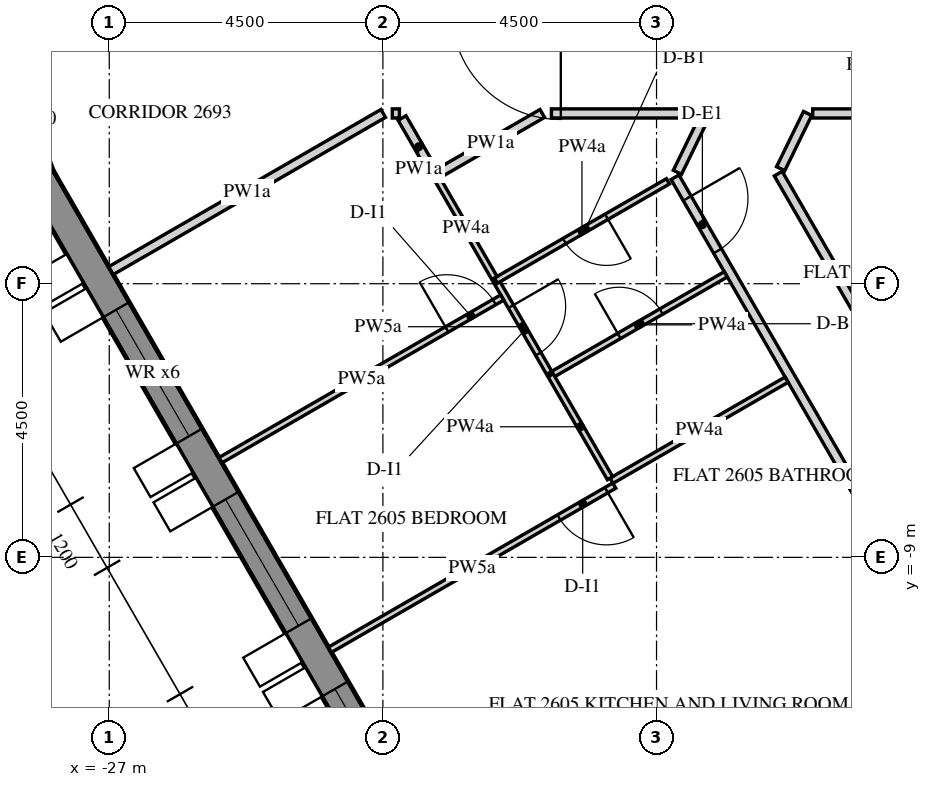
"""IFC4 building model, lengths in metres.
Left out: names, types, materials, properties, quantities, classifications, styles, units other than length and angle.
Written with IfcOpenShell. Run it as: python <this file> out.ifc"""

import sys

from ifc_helpers import new_model, si_unit, direction, frame, frame_2d, origin, place, context, subcontext, project, spatial, polyline, rectangle, outline, extrude, element, fill, save


model = new_model("IFC4")
c1 = context("Model", 3, precision=1e-05, world=origin(), true_north=direction((0.0, 1.0)))
c2 = subcontext(c1, "Body", "Model", "MODEL_VIEW")
j1 = project(units=[si_unit("LENGTHUNIT", "METRE"), si_unit("PLANEANGLEUNIT", "RADIAN")], contexts=[c1])
p1 = place(None, origin())
s1 = spatial("IfcSite", under=j1, at=p1, CompositionType="ELEMENT")
p2 = place(p1, origin())
s2 = spatial("IfcBuilding", under=s1, at=p2, CompositionType="ELEMENT")
p3 = place(p2, frame((0.0, 0.0, 326.4)))
s3 = spatial("IfcBuildingStorey", under=s2, at=p3, CompositionType="ELEMENT", Elevation=326.4)
p4 = place(p3, frame((-28.578, -1.606, -0.15), z_axis=(0.0, 0.0, 1.0), x_axis=(0.352838463023, -0.935684251771, 0.0)))
e1 = element("IfcWall", 1, at=p4, inside=s3, PredefinedType="SOLIDWALL", context=c2, shape_type="SweptSolid", body=[
    extrude(outline(polyline([(-0.041, -0.25), (1.237, -0.25), (1.196, 0.25), (0.041, 0.25), (-0.041, -0.25)])), origin(), (0.0, 0.0, 1.0), 3.9),
])
p5 = place(p3, frame((-28.149, -2.745, -0.15), z_axis=(0.0, 0.0, 1.0), x_axis=(0.500003737743, -0.866023245787, 0.0)))
e2 = element("IfcWall", 2, at=p5, inside=s3, PredefinedType="SOLIDWALL", context=c2, shape_type="SweptSolid", body=[
    extrude(outline(polyline([(-0.021, -0.25), (25.468, -0.25), (25.421, 0.25), (0.021, 0.25), (-0.021, -0.25)])), origin(), (0.0, 0.0, 1.0), 3.9),
])
p6 = place(p5, frame((2.522, 0.0, 0.75)))
e3 = element("IfcOpeningElement", 3, at=p6, cuts=e2, PredefinedType="OPENING", context=c2, shape_type="SweptSolid", body=[
    extrude(rectangle(XDim=2.4, YDim=2.7, at=frame_2d((1.2, 1.35))), frame((0.0, 0.26, 0.0), z_axis=(0.0, -1.0, 0.0), x_axis=(1.0, 0.0, 0.0)), (0.0, 0.0, 1.0), 0.52),
])
p7 = place(p5, frame((6.122, 0.0, 0.75)))
e4 = element("IfcOpeningElement", 4, at=p7, cuts=e2, PredefinedType="OPENING", context=c2, shape_type="SweptSolid", body=[
    extrude(rectangle(XDim=2.4, YDim=2.7, at=frame_2d((1.2, 1.35))), frame((0.0, 0.26, 0.0), z_axis=(0.0, -1.0, 0.0), x_axis=(1.0, 0.0, 0.0)), (0.0, 0.0, 1.0), 0.52),
])
p8 = place(p5, frame((9.722, 0.0, 0.75)))
e5 = element("IfcOpeningElement", 5, at=p8, cuts=e2, PredefinedType="OPENING", context=c2, shape_type="SweptSolid", body=[
    extrude(rectangle(XDim=2.4, YDim=2.7, at=frame_2d((1.2, 1.35))), frame((0.0, 0.26, 0.0), z_axis=(0.0, -1.0, 0.0), x_axis=(1.0, 0.0, 0.0)), (0.0, 0.0, 1.0), 0.52),
])
p9 = place(p5, frame((13.323, 0.0, 0.75)))
e6 = element("IfcOpeningElement", 6, at=p9, cuts=e2, PredefinedType="OPENING", context=c2, shape_type="SweptSolid", body=[
    extrude(rectangle(XDim=2.4, YDim=2.7, at=frame_2d((1.2, 1.35))), frame((0.0, 0.26, 0.0), z_axis=(0.0, -1.0, 0.0), x_axis=(1.0, 0.0, 0.0)), (0.0, 0.0, 1.0), 0.52),
])
p10 = place(p5, frame((16.922, 0.0, 0.75)))
e7 = element("IfcOpeningElement", 7, at=p10, cuts=e2, PredefinedType="OPENING", context=c2, shape_type="SweptSolid", body=[
    extrude(rectangle(XDim=2.4, YDim=2.7, at=frame_2d((1.2, 1.35))), frame((0.0, 0.26, 0.0), z_axis=(0.0, -1.0, 0.0), x_axis=(1.0, 0.0, 0.0)), (0.0, 0.0, 1.0), 0.52),
])
p11 = place(p5, frame((20.522, 0.0, 0.75)))
e8 = element("IfcOpeningElement", 8, at=p11, cuts=e2, PredefinedType="OPENING", context=c2, shape_type="SweptSolid", body=[
    extrude(rectangle(XDim=2.4, YDim=2.7, at=frame_2d((1.2, 1.35))), frame((0.0, 0.26, 0.0), z_axis=(0.0, -1.0, 0.0), x_axis=(1.0, 0.0, 0.0)), (0.0, 0.0, 1.0), 0.52),
])
p12 = place(p3, frame((-17.696, -2.749, 0.0), z_axis=(0.0, 0.0, 1.0), x_axis=(0.499997948852, -0.866026588012, 0.0)))
e9 = element("IfcWall", 9, at=p12, inside=s3, PredefinedType="PARTITIONING", context=c2, shape_type="SweptSolid", body=[
    extrude(rectangle(XDim=14.677, YDim=0.15, at=frame_2d((7.339, 0.0))), origin(), (0.0, 0.0, 1.0), 2.838),
])
p13 = place(p12, frame((0.4, 0.0, 0.0)))
e10 = element("IfcOpeningElement", 10, at=p13, cuts=e9, PredefinedType="OPENING", context=c2, shape_type="SweptSolid", body=[
    extrude(rectangle(XDim=1.0, YDim=2.1, at=frame_2d((0.5, 1.05))), frame((0.0, 0.085, 0.0), z_axis=(0.0, -1.0, 0.0), x_axis=(1.0, 0.0, 0.0)), (0.0, 0.0, 1.0), 0.17),
])
p14 = place(p12, frame((13.527, 0.0, 0.0)))
e11 = element("IfcOpeningElement", 11, at=p14, cuts=e9, PredefinedType="OPENING", context=c2, shape_type="SweptSolid", body=[
    extrude(rectangle(XDim=1.0, YDim=2.1, at=frame_2d((0.5, 1.05))), frame((0.0, 0.085, 0.0), z_axis=(0.0, -1.0, 0.0), x_axis=(1.0, 0.0, 0.0)), (0.0, 0.0, 1.0), 0.17),
])
p15 = place(p3, frame((-26.971, -4.284, 0.0), z_axis=(0.0, 0.0, 1.0), x_axis=(0.866019619451, 0.500010018626, 0.0)))
e12 = element("IfcWall", 12, at=p15, inside=s3, PredefinedType="PARTITIONING", context=c2, shape_type="SweptSolid", body=[
    extrude(rectangle(XDim=5.169, YDim=0.15, at=frame_2d((2.584, 0.0))), origin(), (0.0, 0.0, 1.0), 2.838),
])
p16 = place(p3, frame((-22.345, -1.7, 0.0), z_axis=(0.0, 0.0, 1.0), x_axis=(1.0, 0.0, 0.0)))
e13 = element("IfcWall", 13, at=p16, inside=s3, PredefinedType="PARTITIONING", context=c2, shape_type="SweptSolid", body=[
    extrude(rectangle(XDim=0.117, YDim=0.15, at=frame_2d((0.059, 0.0))), origin(), (0.0, 0.0, 1.0), 2.838),
])
p17 = place(p3, frame((-22.185, -1.775, 0.0), z_axis=(0.0, 0.0, 1.0), x_axis=(0.499819250349, -0.866129734497, 0.0)))
e14 = element("IfcWall", 14, at=p17, inside=s3, PredefinedType="PARTITIONING", context=c2, shape_type="SweptSolid", body=[
    extrude(rectangle(XDim=1.092, YDim=0.15, at=frame_2d((0.546, 0.0))), origin(), (0.0, 0.0, 1.0), 2.838),
])
p18 = place(p3, frame((-21.576, -2.68, 0.0), z_axis=(0.0, 0.0, 1.0), x_axis=(0.866034128446, 0.499984888139, 0.0)))
e15 = element("IfcWall", 15, at=p18, inside=s3, PredefinedType="PARTITIONING", context=c2, shape_type="SweptSolid", body=[
    extrude(rectangle(XDim=1.959, YDim=0.15, at=frame_2d((0.98, 0.0))), origin(), (0.0, 0.0, 1.0), 2.838),
])
p19 = place(p3, frame((-19.729, -1.7, 0.0), z_axis=(0.0, 0.0, 1.0), x_axis=(1.0, 0.0, 0.0)))
e16 = element("IfcWall", 16, at=p19, inside=s3, PredefinedType="PARTITIONING", context=c2, shape_type="SweptSolid", body=[
    extrude(rectangle(XDim=2.544, YDim=0.15, at=frame_2d((1.272, 0.0))), origin(), (0.0, 0.0, 1.0), 2.838),
])
p20 = place(p3, frame((-17.221, -1.775, 0.0), z_axis=(0.0, 0.0, 1.0), x_axis=(-0.43834617456, -0.89880622564, 0.0)))
e17 = element("IfcWall", 17, at=p20, inside=s3, PredefinedType="PARTITIONING", context=c2, shape_type="SweptSolid", body=[
    extrude(rectangle(XDim=0.994, YDim=0.15, at=frame_2d((0.497, 0.0))), origin(), (0.0, 0.0, 1.0), 2.838),
])
p21 = place(p3, frame((-13.74, -6.601, 0.0), z_axis=(0.0, 0.0, 1.0), x_axis=(-0.499976727135, 0.866038839962, 0.0)))
e18 = element("IfcWall", 18, at=p21, inside=s3, PredefinedType="PARTITIONING", context=c2, shape_type="SweptSolid", body=[
    extrude(rectangle(XDim=4.516, YDim=0.15, at=frame_2d((2.258, 0.0))), origin(), (0.0, 0.0, 1.0), 2.838),
])
p22 = place(p3, frame((-15.959, -2.609, 0.0), z_axis=(0.0, 0.0, 1.0), x_axis=(0.43849974808, 0.898731311869, 0.0)))
e19 = element("IfcWall", 19, at=p22, inside=s3, PredefinedType="PARTITIONING", context=c2, shape_type="SweptSolid", body=[
    extrude(rectangle(XDim=1.011, YDim=0.15, at=frame_2d((0.505, 0.0))), origin(), (0.0, 0.0, 1.0), 2.838),
])
p23 = place(p3, frame((-15.432, -1.7, 0.0), z_axis=(0.0, 0.0, 1.0), x_axis=(1.0, 0.0, 0.0)))
e20 = element("IfcWall", 20, at=p23, inside=s3, PredefinedType="PARTITIONING", context=c2, shape_type="SweptSolid", body=[
    extrude(rectangle(XDim=0.946, YDim=0.15, at=frame_2d((0.473, 0.0))), origin(), (0.0, 0.0, 1.0), 2.838),
])
p24 = place(p3, frame((-15.861, -6.078, 0.0), z_axis=(0.0, 0.0, 1.0), x_axis=(-0.866020521143, -0.500008456887, 0.0)))
e21 = element("IfcWall", 21, at=p24, inside=s3, PredefinedType="PARTITIONING", context=c2, shape_type="SweptSolid", body=[
    extrude(rectangle(XDim=3.325, YDim=0.1, at=frame_2d((1.663, 0.0))), origin(), (0.0, 0.0, 1.0), 2.838),
])
p25 = place(p3, frame((-18.695, -7.82, 0.0), z_axis=(0.0, 0.0, 1.0), x_axis=(-0.866028230842, -0.499995103361, 0.0)))
e22 = element("IfcWall", 22, at=p25, inside=s3, PredefinedType="PARTITIONING", context=c2, shape_type="SweptSolid", body=[
    extrude(rectangle(XDim=5.4, YDim=0.1, at=frame_2d((2.7, 0.0))), origin(), (0.0, 0.0, 1.0), 2.838),
])
p26 = place(p25, frame((0.15, 0.0, 0.0)))
e23 = element("IfcOpeningElement", 23, at=p26, cuts=e22, PredefinedType="OPENING", context=c2, shape_type="SweptSolid", body=[
    extrude(rectangle(XDim=0.9, YDim=2.1, at=frame_2d((0.45, 1.05))), frame((0.0, 0.06, 0.0), z_axis=(0.0, -1.0, 0.0), x_axis=(1.0, 0.0, 0.0)), (0.0, 0.0, 1.0), 0.12),
])
p27 = place(p3, frame((-19.741, -6.008, 0.0), z_axis=(0.0, 0.0, 1.0), x_axis=(0.866052313871, 0.499953387465, 0.0)))
e24 = element("IfcWall", 24, at=p27, inside=s3, PredefinedType="PARTITIONING", context=c2, shape_type="SweptSolid", body=[
    extrude(rectangle(XDim=3.325, YDim=0.1, at=frame_2d((1.663, 0.0))), origin(), (0.0, 0.0, 1.0), 2.838),
])
p28 = place(p27, frame((1.3, 0.0, 0.0)))
e25 = element("IfcOpeningElement", 25, at=p28, cuts=e24, PredefinedType="OPENING", context=c2, shape_type="SweptSolid", body=[
    extrude(rectangle(XDim=0.8, YDim=2.1, at=frame_2d((0.4, 1.05))), frame((0.0, 0.06, 0.0), z_axis=(0.0, -1.0, 0.0), x_axis=(1.0, 0.0, 0.0)), (0.0, 0.0, 1.0), 0.12),
])
p29 = place(p3, frame((-20.642, -4.448, 0.0), z_axis=(0.0, 0.0, 1.0), x_axis=(0.499971461383, -0.866041879935, 0.0)))
e26 = element("IfcWall", 26, at=p29, inside=s3, PredefinedType="PARTITIONING", context=c2, shape_type="SweptSolid", body=[
    extrude(rectangle(XDim=1.754, YDim=0.1, at=frame_2d((0.877, 0.0))), origin(), (0.0, 0.0, 1.0), 2.838),
])
p30 = place(p29, frame((0.494, 0.0, 0.0)))
e27 = element("IfcOpeningElement", 27, at=p30, cuts=e26, PredefinedType="OPENING", context=c2, shape_type="SweptSolid", body=[
    extrude(rectangle(XDim=0.9, YDim=2.1, at=frame_2d((0.45, 1.05))), frame((0.0, 0.06, 0.0), z_axis=(0.0, -1.0, 0.0), x_axis=(1.0, 0.0, 0.0)), (0.0, 0.0, 1.0), 0.12),
])
p31 = place(p3, frame((-17.812, -2.816, 0.0), z_axis=(0.0, 0.0, 1.0), x_axis=(-0.866044918084, -0.499966198718, 0.0)))
e28 = element("IfcWall", 28, at=p31, inside=s3, PredefinedType="PARTITIONING", context=c2, shape_type="SweptSolid", body=[
    extrude(rectangle(XDim=3.266, YDim=0.1, at=frame_2d((1.633, 0.0))), origin(), (0.0, 0.0, 1.0), 2.838),
])
p32 = place(p31, frame((1.166, 0.0, 0.0)))
e29 = element("IfcOpeningElement", 29, at=p32, cuts=e28, PredefinedType="OPENING", context=c2, shape_type="SweptSolid", body=[
    extrude(rectangle(XDim=0.8, YDim=2.1, at=frame_2d((0.4, 1.05))), frame((0.0, 0.06, 0.0), z_axis=(0.0, -1.0, 0.0), x_axis=(1.0, 0.0, 0.0)), (0.0, 0.0, 1.0), 0.12),
])
p33 = place(p3, frame((-19.742, -6.006, 0.0), z_axis=(0.0, 0.0, 1.0), x_axis=(0.499982003349, -0.866035793907, 0.0)))
e30 = element("IfcWall", 30, at=p33, inside=s3, PredefinedType="PARTITIONING", context=c2, shape_type="SweptSolid", body=[
    extrude(rectangle(XDim=1.954, YDim=0.1, at=frame_2d((0.977, 0.0))), origin(), (0.0, 0.0, 1.0), 2.838),
])
p34 = place(p3, frame((-25.171, -7.402, 0.0), z_axis=(0.0, 0.0, 1.0), x_axis=(0.866013074135, 0.500021354972, 0.0)))
e31 = element("IfcWall", 31, at=p34, inside=s3, PredefinedType="PARTITIONING", context=c2, shape_type="SweptSolid", body=[
    extrude(rectangle(XDim=5.35, YDim=0.1, at=frame_2d((2.675, 0.0))), origin(), (0.0, 0.0, 1.0), 2.838),
])
p35 = place(p34, frame((4.3, 0.0, 0.0)))
e32 = element("IfcOpeningElement", 32, at=p35, cuts=e31, PredefinedType="OPENING", context=c2, shape_type="SweptSolid", body=[
    extrude(rectangle(XDim=0.9, YDim=2.1, at=frame_2d((0.45, 1.05))), frame((0.0, 0.06, 0.0), z_axis=(0.0, -1.0, 0.0), x_axis=(1.0, 0.0, 0.0)), (0.0, 0.0, 1.0), 0.12),
])
p36 = place(p3, frame((-20.666, -4.406, 0.0), z_axis=(0.0, 0.0, 1.0), x_axis=(-0.500004234368, 0.866022959057, 0.0)))
e33 = element("IfcWall", 33, at=p36, inside=s3, PredefinedType="PARTITIONING", context=c2, shape_type="SweptSolid", body=[
    extrude(rectangle(XDim=1.875, YDim=0.1, at=frame_2d((0.938, 0.0))), origin(), (0.0, 0.0, 1.0), 2.838),
])
p37 = place(p6, frame((0.0, 0.18, 0.0)))
e34 = element("IfcWindow", 34, at=p37, inside=s3, PartitioningType="DOUBLE_PANEL_VERTICAL", PredefinedType="WINDOW", context=c2, shape_type="SweptSolid", body=[
    extrude(rectangle(XDim=2.4, YDim=2.7, at=frame_2d((1.2, 1.35))), frame((0.0, 0.03, 0.0), z_axis=(0.0, -1.0, 0.0), x_axis=(1.0, 0.0, 0.0)), (0.0, 0.0, 1.0), 0.06),
])
fill(e3, e34)
p38 = place(p7, frame((0.0, 0.18, 0.0)))
e35 = element("IfcWindow", 35, at=p38, inside=s3, PartitioningType="DOUBLE_PANEL_VERTICAL", PredefinedType="WINDOW", context=c2, shape_type="SweptSolid", body=[
    extrude(rectangle(XDim=2.4, YDim=2.7, at=frame_2d((1.2, 1.35))), frame((0.0, 0.03, 0.0), z_axis=(0.0, -1.0, 0.0), x_axis=(1.0, 0.0, 0.0)), (0.0, 0.0, 1.0), 0.06),
])
fill(e4, e35)
p39 = place(p8, frame((0.0, 0.18, 0.0)))
e36 = element("IfcWindow", 36, at=p39, inside=s3, PartitioningType="DOUBLE_PANEL_VERTICAL", PredefinedType="WINDOW", context=c2, shape_type="SweptSolid", body=[
    extrude(rectangle(XDim=2.4, YDim=2.7, at=frame_2d((1.2, 1.35))), frame((0.0, 0.03, 0.0), z_axis=(0.0, -1.0, 0.0), x_axis=(1.0, 0.0, 0.0)), (0.0, 0.0, 1.0), 0.06),
])
fill(e5, e36)
p40 = place(p13, origin())
e37 = element("IfcDoor", 37, at=p40, inside=s3, OperationType="SINGLE_SWING_RIGHT", PredefinedType="DOOR", context=c2, shape_type="SweptSolid", body=[
    extrude(rectangle(XDim=1.0, YDim=2.1, at=frame_2d((0.5, 1.05))), frame((0.0, 0.025, 0.0), z_axis=(0.0, -1.0, 0.0), x_axis=(1.0, 0.0, 0.0)), (0.0, 0.0, 1.0), 0.05),
])
fill(e10, e37)
p41 = place(p28, origin())
e38 = element("IfcDoor", 38, at=p41, inside=s3, OperationType="SINGLE_SWING_LEFT", PredefinedType="DOOR", context=c2, shape_type="SweptSolid", body=[
    extrude(rectangle(XDim=0.8, YDim=2.1, at=frame_2d((0.4, 1.05))), frame((0.0, 0.025, 0.0), z_axis=(0.0, -1.0, 0.0), x_axis=(1.0, 0.0, 0.0)), (0.0, 0.0, 1.0), 0.05),
])
fill(e25, e38)
p42 = place(p30, origin())
e39 = element("IfcDoor", 39, at=p42, inside=s3, OperationType="SINGLE_SWING_RIGHT", PredefinedType="DOOR", context=c2, shape_type="SweptSolid", body=[
    extrude(rectangle(XDim=0.9, YDim=2.1, at=frame_2d((0.45, 1.05))), frame((0.0, 0.025, 0.0), z_axis=(0.0, -1.0, 0.0), x_axis=(1.0, 0.0, 0.0)), (0.0, 0.0, 1.0), 0.05),
])
fill(e27, e39)
p43 = place(p35, origin())
e40 = element("IfcDoor", 40, at=p43, inside=s3, OperationType="SINGLE_SWING_RIGHT", PredefinedType="DOOR", context=c2, shape_type="SweptSolid", body=[
    extrude(rectangle(XDim=0.9, YDim=2.1, at=frame_2d((0.45, 1.05))), frame((0.0, 0.025, 0.0), z_axis=(0.0, -1.0, 0.0), x_axis=(1.0, 0.0, 0.0)), (0.0, 0.0, 1.0), 0.05),
])
fill(e32, e40)
p44 = place(p26, origin())
e41 = element("IfcDoor", 41, at=p44, inside=s3, OperationType="SINGLE_SWING_RIGHT", PredefinedType="DOOR", context=c2, shape_type="SweptSolid", body=[
    extrude(rectangle(XDim=0.9, YDim=2.1, at=frame_2d((0.45, 1.05))), frame((0.0, 0.025, 0.0), z_axis=(0.0, -1.0, 0.0), x_axis=(1.0, 0.0, 0.0)), (0.0, 0.0, 1.0), 0.05),
])
fill(e23, e41)
p45 = place(p32, origin())
e42 = element("IfcDoor", 42, at=p45, inside=s3, OperationType="SINGLE_SWING_RIGHT", PredefinedType="DOOR", context=c2, shape_type="SweptSolid", body=[
    extrude(rectangle(XDim=0.8, YDim=2.1, at=frame_2d((0.4, 1.05))), frame((0.0, 0.025, 0.0), z_axis=(0.0, -1.0, 0.0), x_axis=(1.0, 0.0, 0.0)), (0.0, 0.0, 1.0), 0.05),
])
fill(e29, e42)
save(model, sys.argv[1])
